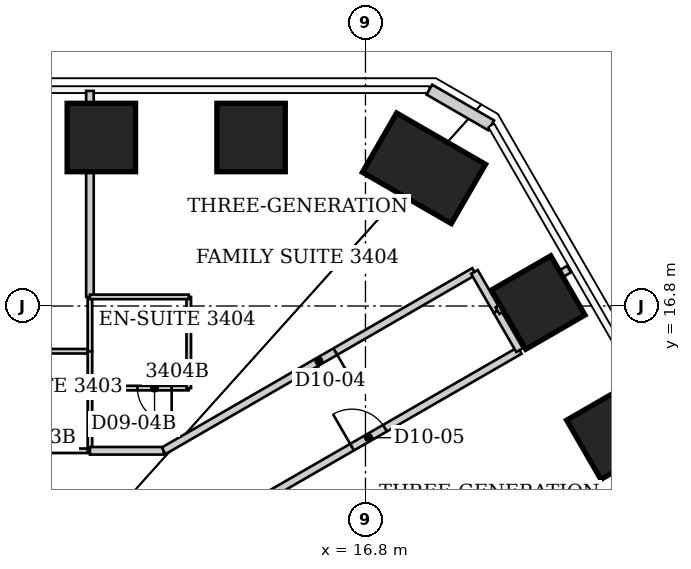
"""IFC4 building model, lengths in metres.
Left out: names, types, materials, properties, quantities, classifications, styles, units other than length and angle.
Written with IfcOpenShell. Run it as: python <this file> out.ifc"""

import sys

from ifc_helpers import new_model, si_unit, direction, frame, frame_2d, origin, origin_2d, place, context, subcontext, project, spatial, rectangle, extrude, element, fill, save


model = new_model("IFC4")
c1 = context("Model", 3, precision=1e-05, world=origin(), true_north=direction((0.0, 1.0)))
c2 = subcontext(c1, "Body", "Model", "MODEL_VIEW")
j1 = project(units=[si_unit("LENGTHUNIT", "METRE"), si_unit("PLANEANGLEUNIT", "RADIAN")], contexts=[c1])
p1 = place(None, origin())
s1 = spatial("IfcSite", under=j1, at=p1, CompositionType="ELEMENT")
p2 = place(p1, origin())
s2 = spatial("IfcBuilding", under=s1, at=p2, CompositionType="ELEMENT")
p3 = place(p2, frame((0.0, 0.0, 138.6)))
s3 = spatial("IfcBuildingStorey", under=s2, at=p3, CompositionType="ELEMENT", Elevation=138.6)
for number, where, z_axis, x_axis in (
    (1, (9.85, 21.234, 0.0), (0.0, 0.0, 1.0), (0.0, 1.0, 0.0)),
    (2, (13.79, 21.234, 0.0), (0.0, 0.0, 1.0), (0.0, 1.0, 0.0)),
):
    element("IfcColumn", number, at=place(p3, frame(where, z_axis=z_axis, x_axis=x_axis)), inside=s3, PredefinedType="COLUMN", context=c2, shape_type="SweptSolid", body=[
        extrude(rectangle(XDim=1.8, YDim=1.8, at=origin_2d()), origin(), (0.0, 0.0, 1.0), 3.8),
    ])
p4 = place(p3, frame((18.339, 20.424, 0.0), z_axis=(0.0, 0.0, 1.0), x_axis=(0.5, 0.866025403784, 0.0)))
e3 = element("IfcColumn", 3, at=p4, inside=s3, PredefinedType="COLUMN", context=c2, shape_type="SweptSolid", body=[
    extrude(rectangle(XDim=1.8, YDim=2.7, at=origin_2d()), origin(), (0.0, 0.0, 1.0), 3.8),
])
for number, where, z_axis, x_axis in (
    (4, (21.346, 16.891, 0.0), (0.0, 0.0, 1.0), (0.866, 0.5, 0.0)),
    (5, (23.324, 13.466, 0.0), (0.0, 0.0, 1.0), (0.866, 0.5, 0.0)),
):
    element("IfcColumn", number, at=place(p3, frame(where, z_axis=z_axis, x_axis=x_axis)), inside=s3, PredefinedType="COLUMN", context=c2, shape_type="SweptSolid", body=[
        extrude(rectangle(XDim=1.8, YDim=1.8, at=origin_2d()), origin(), (0.0, 0.0, 1.0), 3.8),
    ])
p5 = place(p3, frame((18.481, 22.494, 0.0), z_axis=(0.0, 0.0, 1.0), x_axis=(0.865988793993, -0.500063404658, 0.0)))
e6 = element("IfcWall", 6, at=p5, inside=s3, PredefinedType="SOLIDWALL", context=c2, shape_type="SweptSolid", body=[
    extrude(rectangle(XDim=1.88, YDim=0.3, at=frame_2d((0.94, 0.0))), origin(), (0.0, 0.0, 1.0), 3.64),
])
p6 = place(p3, frame((9.55, 12.99, 0.0), z_axis=(0.0, 0.0, 1.0), x_axis=(-1.0, 0.0, 0.0)))
e7 = element("IfcWall", 7, at=p6, inside=s3, PredefinedType="PARTITIONING", context=c2, shape_type="SweptSolid", body=[
    extrude(rectangle(XDim=2.4, YDim=0.12, at=frame_2d((1.2, 0.0))), origin(), (0.0, 0.0, 1.0), 3.64),
])
p7 = place(p3, frame((9.55, 14.64, 0.0), z_axis=(0.0, 0.0, 1.0), x_axis=(0.0, -1.0, 0.0)))
e8 = element("IfcWall", 8, at=p7, inside=s3, PredefinedType="PARTITIONING", context=c2, shape_type="SweptSolid", body=[
    extrude(rectangle(XDim=1.65, YDim=0.12, at=frame_2d((0.825, 0.0))), origin(), (0.0, 0.0, 1.0), 3.64),
])
p8 = place(p3, frame((9.55, 14.64, 0.0), z_axis=(0.0, 0.0, 1.0), x_axis=(1.0, 0.0, 0.0)))
e9 = element("IfcWall", 9, at=p8, inside=s3, PredefinedType="PARTITIONING", context=c2, shape_type="SweptSolid", body=[
    extrude(rectangle(XDim=2.6, YDim=0.12, at=frame_2d((1.3, 0.0))), origin(), (0.0, 0.0, 1.0), 3.64),
])
p9 = place(p8, frame((1.25, 0.0, 0.0)))
e10 = element("IfcOpeningElement", 10, at=p9, cuts=e9, PredefinedType="OPENING", context=c2, shape_type="SweptSolid", body=[
    extrude(rectangle(XDim=0.9, YDim=2.03, at=frame_2d((0.45, 1.015))), frame((0.0, 0.06, 0.0), z_axis=(0.0, -1.0, 0.0), x_axis=(1.0, 0.0, 0.0)), (0.0, 0.0, 1.0), 0.12),
])
p10 = place(p3, frame((9.55, 15.61, 0.0), z_axis=(0.0, 0.0, 1.0), x_axis=(-1.0, 0.0, 0.0)))
e11 = element("IfcWall", 11, at=p10, inside=s3, PredefinedType="PARTITIONING", context=c2, shape_type="SweptSolid", body=[
    extrude(rectangle(XDim=2.4, YDim=0.12, at=frame_2d((1.2, 0.0))), origin(), (0.0, 0.0, 1.0), 3.64),
])
p11 = place(p3, frame((9.55, 15.61, 0.0), z_axis=(0.0, 0.0, 1.0), x_axis=(0.0, -1.0, 0.0)))
e12 = element("IfcWall", 12, at=p11, inside=s3, PredefinedType="PARTITIONING", context=c2, shape_type="SweptSolid", body=[
    extrude(rectangle(XDim=0.97, YDim=0.12, at=frame_2d((0.485, 0.0))), origin(), (0.0, 0.0, 1.0), 3.64),
])
p12 = place(p3, frame((9.55, 17.04, 0.0), z_axis=(0.0, 0.0, 1.0), x_axis=(0.0, -1.0, 0.0)))
e13 = element("IfcWall", 13, at=p12, inside=s3, PredefinedType="PARTITIONING", context=c2, shape_type="SweptSolid", body=[
    extrude(rectangle(XDim=1.43, YDim=0.12, at=frame_2d((0.715, 0.0))), origin(), (0.0, 0.0, 1.0), 3.64),
])
p13 = place(p3, frame((9.55, 22.46, 0.0), z_axis=(0.0, 0.0, 1.0), x_axis=(0.0, -1.0, 0.0)))
e14 = element("IfcWall", 14, at=p13, inside=s3, PredefinedType="PARTITIONING", context=c2, shape_type="SweptSolid", body=[
    extrude(rectangle(XDim=5.42, YDim=0.2, at=frame_2d((2.71, 0.0))), origin(), (0.0, 0.0, 1.0), 3.64),
])
p14 = place(p3, frame((11.49, 12.99, 0.0), z_axis=(0.0, 0.0, 1.0), x_axis=(-1.0, 0.0, 0.0)))
e15 = element("IfcWall", 15, at=p14, inside=s3, PredefinedType="PARTITIONING", context=c2, shape_type="SweptSolid", body=[
    extrude(rectangle(XDim=1.94, YDim=0.2, at=frame_2d((0.97, 0.0))), origin(), (0.0, 0.0, 1.0), 3.64),
])
p15 = place(p3, frame((12.15, 14.64, 0.0), z_axis=(0.0, 0.0, 1.0), x_axis=(0.0, 1.0, 0.0)))
e16 = element("IfcWall", 16, at=p15, inside=s3, PredefinedType="PARTITIONING", context=c2, shape_type="SweptSolid", body=[
    extrude(rectangle(XDim=2.4, YDim=0.12, at=frame_2d((1.2, 0.0))), origin(), (0.0, 0.0, 1.0), 3.64),
])
p16 = place(p3, frame((12.15, 17.04, 0.0), z_axis=(0.0, 0.0, 1.0), x_axis=(-1.0, 0.0, 0.0)))
e17 = element("IfcWall", 17, at=p16, inside=s3, PredefinedType="PARTITIONING", context=c2, shape_type="SweptSolid", body=[
    extrude(rectangle(XDim=2.6, YDim=0.12, at=frame_2d((1.3, 0.0))), origin(), (0.0, 0.0, 1.0), 3.64),
])
p17 = place(p3, frame((12.9, 11.04, 0.0), z_axis=(0.0, 0.0, 1.0), x_axis=(0.866295705695, 0.499531530832, 0.0)))
e18 = element("IfcWall", 18, at=p17, inside=s3, PredefinedType="PARTITIONING", context=c2, shape_type="SweptSolid", body=[
    extrude(rectangle(XDim=9.189, YDim=0.2, at=frame_2d((4.594, 0.0))), origin(), (0.0, 0.0, 1.0), 3.64),
])
p18 = place(p17, frame((4.094, 0.0, 0.0)))
e19 = element("IfcOpeningElement", 19, at=p18, cuts=e18, PredefinedType="OPENING", context=c2, shape_type="SweptSolid", body=[
    extrude(rectangle(XDim=1.0, YDim=2.13, at=frame_2d((0.5, 1.065))), frame((0.0, 0.1, 0.0), z_axis=(0.0, -1.0, 0.0), x_axis=(1.0, 0.0, 0.0)), (0.0, 0.0, 1.0), 0.2),
])
p19 = place(p3, frame((19.66, 17.71, 0.0), z_axis=(0.0, 0.0, 1.0), x_axis=(-0.865884749539, -0.500243541204, 0.0)))
e20 = element("IfcWall", 20, at=p19, inside=s3, PredefinedType="PARTITIONING", context=c2, shape_type="SweptSolid", body=[
    extrude(rectangle(XDim=9.435, YDim=0.2, at=frame_2d((4.718, 0.0))), origin(), (0.0, 0.0, 1.0), 3.64),
])
p20 = place(p19, frame((4.218, 0.0, 0.0)))
e21 = element("IfcOpeningElement", 21, at=p20, cuts=e20, PredefinedType="OPENING", context=c2, shape_type="SweptSolid", body=[
    extrude(rectangle(XDim=1.0, YDim=2.13, at=frame_2d((0.5, 1.065))), frame((0.0, 0.1, 0.0), z_axis=(0.0, -1.0, 0.0), x_axis=(1.0, 0.0, 0.0)), (0.0, 0.0, 1.0), 0.2),
])
p21 = place(p3, frame((19.667, 17.697, 0.0), z_axis=(0.0, 0.0, 1.0), x_axis=(0.499704629046, -0.866195869137, 0.0)))
e22 = element("IfcWall", 22, at=p21, inside=s3, PredefinedType="PARTITIONING", context=c2, shape_type="SweptSolid", body=[
    extrude(rectangle(XDim=1.186, YDim=0.2, at=frame_2d((0.593, 0.0))), origin(), (0.0, 0.0, 1.0), 3.64),
])
p22 = place(p3, frame((20.26, 16.67, 0.0), z_axis=(0.0, 0.0, 1.0), x_axis=(0.499734288277, -0.866178758179, 0.0)))
e23 = element("IfcWall", 23, at=p22, inside=s3, PredefinedType="PARTITIONING", context=c2, shape_type="SweptSolid", body=[
    extrude(rectangle(XDim=1.191, YDim=0.2, at=frame_2d((0.595, 0.0))), origin(), (0.0, 0.0, 1.0), 3.64),
])
p23 = place(p3, frame((22.156, 17.77, 0.0), z_axis=(0.0, 0.0, 1.0), x_axis=(-0.865037029405, -0.501708020425, 0.0)))
e24 = element("IfcWall", 24, at=p23, inside=s3, PredefinedType="PARTITIONING", context=c2, shape_type="SweptSolid", body=[
    extrude(rectangle(XDim=2.177, YDim=0.2, at=frame_2d((1.089, 0.0))), origin(), (0.0, 0.0, 1.0), 3.64),
])
p24 = place(p20, origin())
e25 = element("IfcDoor", 25, at=p24, inside=s3, OperationType="SINGLE_SWING_LEFT", PredefinedType="DOOR", context=c2, shape_type="SweptSolid", body=[
    extrude(rectangle(XDim=1.0, YDim=2.13, at=frame_2d((0.5, 1.065))), frame((0.0, 0.025, 0.0), z_axis=(0.0, -1.0, 0.0), x_axis=(1.0, 0.0, 0.0)), (0.0, 0.0, 1.0), 0.05),
])
fill(e21, e25)
p25 = place(p9, origin())
e26 = element("IfcDoor", 26, at=p25, inside=s3, OperationType="SINGLE_SWING_RIGHT", PredefinedType="DOOR", context=c2, shape_type="SweptSolid", body=[
    extrude(rectangle(XDim=0.9, YDim=2.03, at=frame_2d((0.45, 1.015))), frame((0.0, 0.025, 0.0), z_axis=(0.0, -1.0, 0.0), x_axis=(1.0, 0.0, 0.0)), (0.0, 0.0, 1.0), 0.05),
])
fill(e10, e26)
p26 = place(p18, origin())
e27 = element("IfcDoor", 27, at=p26, inside=s3, OperationType="SINGLE_SWING_LEFT", PredefinedType="DOOR", context=c2, shape_type="SweptSolid", body=[
    extrude(rectangle(XDim=1.0, YDim=2.13, at=frame_2d((0.5, 1.065))), frame((0.0, 0.025, 0.0), z_axis=(0.0, -1.0, 0.0), x_axis=(1.0, 0.0, 0.0)), (0.0, 0.0, 1.0), 0.05),
])
fill(e19, e27)
save(model, sys.argv[1])
